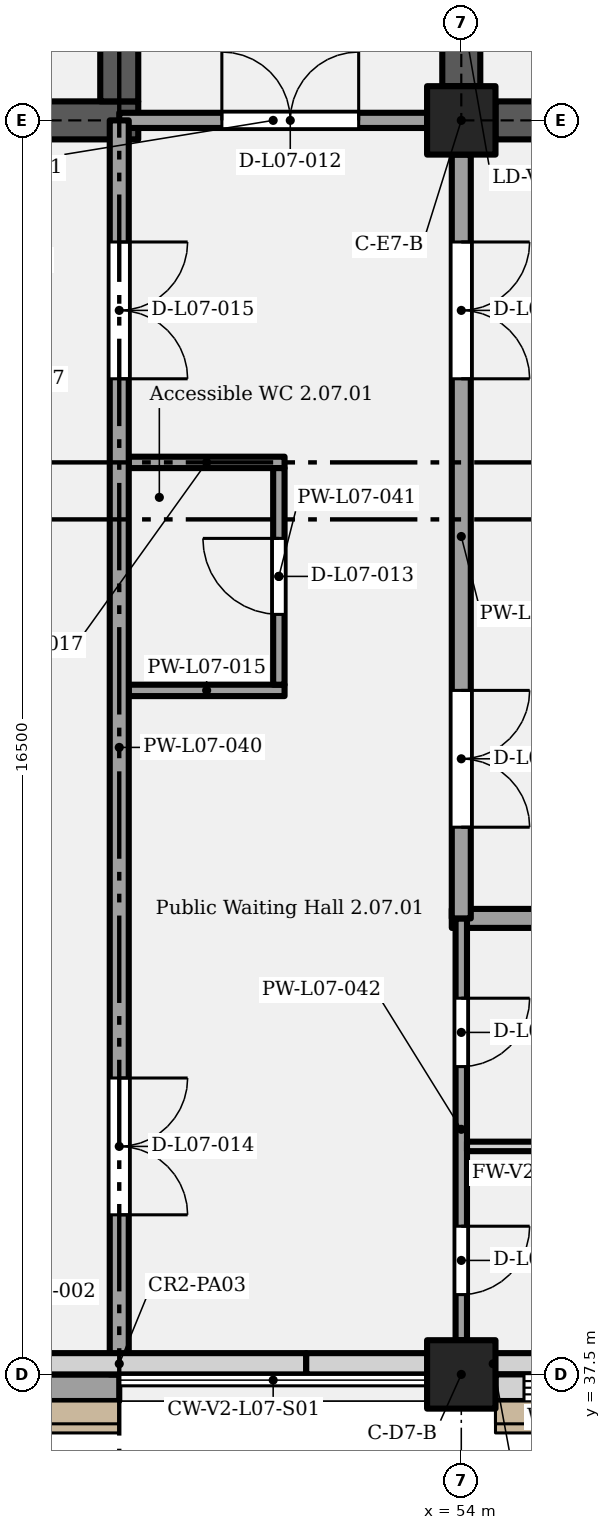
"""IFC4 building model, lengths in metres.
Left out: names, types, materials, properties, quantities, classifications, styles, units other than length and angle.
Written with IfcOpenShell. Run it as: python <this file> out.ifc"""

import sys

from ifc_helpers import new_model, si_unit, direction, frame, frame_2d, origin, origin_2d, place, context, subcontext, project, spatial, rectangle, extrude, element, fill, save


model = new_model("IFC4")
c1 = context("Model", 3, precision=1e-05, world=origin(), true_north=direction((0.0, 1.0)))
c2 = subcontext(c1, "Body", "Model", "MODEL_VIEW")
j1 = project(units=[si_unit("LENGTHUNIT", "METRE"), si_unit("PLANEANGLEUNIT", "RADIAN")], contexts=[c1])
p1 = place(None, origin())
s1 = spatial("IfcSite", under=j1, at=p1, CompositionType="ELEMENT")
p2 = place(p1, origin())
s2 = spatial("IfcBuilding", under=s1, at=p2, CompositionType="ELEMENT")
p3 = place(p2, frame((0.0, 0.0, 39.0)))
s3 = spatial("IfcBuildingStorey", under=s2, at=p3, CompositionType="ELEMENT", Elevation=39.0)
for number, where, z_axis, x_axis in (
    (1, (54.0, 37.5, 0.0), (0.0, 0.0, 1.0), (1.0, 0.0, 0.0)),
    (2, (54.0, 54.0, 0.0), (0.0, 0.0, 1.0), (1.0, 0.0, 0.0)),
):
    element("IfcColumn", number, at=place(p3, frame(where, z_axis=z_axis, x_axis=x_axis)), inside=s3, PredefinedType="COLUMN", context=c2, shape_type="SweptSolid", body=[
        extrude(rectangle(XDim=0.9, YDim=0.9, at=origin_2d()), origin(), (0.0, 0.0, 1.0), 5.4),
    ])
p4 = place(p3, frame((46.25, 54.0, 0.0), z_axis=(0.0, 0.0, 1.0), x_axis=(1.0, 0.0, 0.0)))
e3 = element("IfcWall", 3, at=p4, inside=s3, PredefinedType="SHEAR", context=c2, shape_type="SweptSolid", body=[
    extrude(rectangle(XDim=3.5, YDim=0.5, at=frame_2d((1.75, 0.0))), origin(), (0.0, 0.0, 1.0), 5.15),
])
p5 = place(p3, frame((54.45, 54.0, 0.0), z_axis=(0.0, 0.0, 1.0), x_axis=(1.0, 0.0, 0.0)))
e4 = element("IfcWall", 4, at=p5, inside=s3, PredefinedType="SHEAR", context=c2, shape_type="SweptSolid", body=[
    extrude(rectangle(XDim=2.8, YDim=0.5, at=frame_2d((1.4, 0.0))), origin(), (0.0, 0.0, 1.0), 5.15),
])
p6 = place(p3, frame((49.5, 54.25, 0.0), z_axis=(0.0, 0.0, 1.0), x_axis=(0.0, 1.0, 0.0)))
e5 = element("IfcWall", 5, at=p6, inside=s3, PredefinedType="SHEAR", context=c2, shape_type="SweptSolid", body=[
    extrude(rectangle(XDim=11.5, YDim=0.5, at=frame_2d((5.75, 0.0))), origin(), (0.0, 0.0, 1.0), 5.15),
])
p7 = place(p6, frame((0.7, 0.0, 0.0)))
e6 = element("IfcOpeningElement", 6, at=p7, cuts=e5, PredefinedType="OPENING", context=c2, shape_type="SweptSolid", body=[
    extrude(rectangle(XDim=1.1, YDim=2.1, at=frame_2d((0.55, 1.05))), frame((0.0, 0.26, 0.0), z_axis=(0.0, -1.0, 0.0), x_axis=(1.0, 0.0, 0.0)), (0.0, 0.0, 1.0), 0.52),
])
p8 = place(p6, frame((4.35, 0.0, 0.0), z_axis=(0.0, 0.0, 1.0), x_axis=(-1.0, 0.0, 0.0)))
e7 = element("IfcOpeningElement", 7, at=p8, cuts=e5, PredefinedType="OPENING", context=c2, shape_type="SweptSolid", body=[
    extrude(rectangle(XDim=1.2, YDim=2.1, at=frame_2d((0.6, 1.05))), frame((0.0, 0.26, 0.0), z_axis=(0.0, -1.0, 0.0), x_axis=(1.0, 0.0, 0.0)), (0.0, 0.0, 1.0), 0.52),
])
p9 = place(p3, frame((54.0, 54.45, 0.0), z_axis=(0.0, 0.0, 1.0), x_axis=(0.0, 1.0, 0.0)))
e8 = element("IfcWall", 8, at=p9, inside=s3, PredefinedType="SHEAR", context=c2, shape_type="SweptSolid", body=[
    extrude(rectangle(XDim=11.1, YDim=0.5, at=frame_2d((5.55, 0.0))), origin(), (0.0, 0.0, 1.0), 5.15),
])
p10 = place(p9, frame((0.5, 0.0, 0.0)))
e9 = element("IfcOpeningElement", 9, at=p10, cuts=e8, PredefinedType="OPENING", context=c2, shape_type="SweptSolid", body=[
    extrude(rectangle(XDim=1.1, YDim=2.1, at=frame_2d((0.55, 1.05))), frame((0.0, 0.26, 0.0), z_axis=(0.0, -1.0, 0.0), x_axis=(1.0, 0.0, 0.0)), (0.0, 0.0, 1.0), 0.52),
])
p11 = place(p9, frame((2.95, 0.0, 0.0)))
e10 = element("IfcOpeningElement", 10, at=p11, cuts=e8, PredefinedType="OPENING", context=c2, shape_type="SweptSolid", body=[
    extrude(rectangle(XDim=1.2, YDim=2.1, at=frame_2d((0.6, 1.05))), frame((0.0, 0.26, 0.0), z_axis=(0.0, -1.0, 0.0), x_axis=(1.0, 0.0, 0.0)), (0.0, 0.0, 1.0), 0.52),
])
p12 = place(p3, frame((45.45, 37.325, 0.0), z_axis=(0.0, 0.0, 1.0), x_axis=(1.0, 0.0, 0.0)))
e11 = element("IfcWall", 11, at=p12, inside=s3, PredefinedType="SOLIDWALL", context=c2, shape_type="SweptSolid", body=[
    extrude(rectangle(XDim=4.05, YDim=0.35, at=frame_2d((2.025, 0.0))), origin(), (0.0, 0.0, 1.0), 5.15),
])
p13 = place(p12, frame((0.375, 0.0, 1.2)))
e12 = element("IfcOpeningElement", 12, at=p13, cuts=e11, PredefinedType="OPENING", context=c2, shape_type="SweptSolid", body=[
    extrude(rectangle(XDim=1.35, YDim=3.0, at=frame_2d((0.675, 1.5))), frame((0.0, 0.185, 0.0), z_axis=(0.0, -1.0, 0.0), x_axis=(1.0, 0.0, 0.0)), (0.0, 0.0, 1.0), 0.37),
])
p14 = place(p3, frame((54.45, 37.325, 0.0), z_axis=(0.0, 0.0, 1.0), x_axis=(1.0, 0.0, 0.0)))
e13 = element("IfcWall", 13, at=p14, inside=s3, PredefinedType="SOLIDWALL", context=c2, shape_type="SweptSolid", body=[
    extrude(rectangle(XDim=8.1, YDim=0.35, at=frame_2d((4.05, 0.0))), origin(), (0.0, 0.0, 1.0), 5.15),
])
p15 = place(p14, frame((0.375, 0.0, 1.2)))
e14 = element("IfcOpeningElement", 14, at=p15, cuts=e13, PredefinedType="OPENING", context=c2, shape_type="SweptSolid", body=[
    extrude(rectangle(XDim=1.35, YDim=3.0, at=frame_2d((0.675, 1.5))), frame((0.0, 0.185, 0.0), z_axis=(0.0, -1.0, 0.0), x_axis=(1.0, 0.0, 0.0)), (0.0, 0.0, 1.0), 0.37),
])
p16 = place(p14, frame((3.375, 0.0, 1.2)))
e15 = element("IfcOpeningElement", 15, at=p16, cuts=e13, PredefinedType="OPENING", context=c2, shape_type="SweptSolid", body=[
    extrude(rectangle(XDim=1.35, YDim=3.0, at=frame_2d((0.675, 1.5))), frame((0.0, 0.185, 0.0), z_axis=(0.0, -1.0, 0.0), x_axis=(1.0, 0.0, 0.0)), (0.0, 0.0, 1.0), 0.37),
])
p17 = place(p14, frame((6.375, 0.0, 1.2)))
e16 = element("IfcOpeningElement", 16, at=p17, cuts=e13, PredefinedType="OPENING", context=c2, shape_type="SweptSolid", body=[
    extrude(rectangle(XDim=1.35, YDim=3.0, at=frame_2d((0.675, 1.5))), frame((0.0, 0.185, 0.0), z_axis=(0.0, -1.0, 0.0), x_axis=(1.0, 0.0, 0.0)), (0.0, 0.0, 1.0), 0.37),
])
p18 = place(p3, frame((47.04, 37.64, 5.4), z_axis=(0.0, 0.0, 1.0), x_axis=(1.0, 0.0, 0.0)))
e17 = element("IfcWall", 17, at=p18, inside=s3, PredefinedType="PARAPET", context=c2, shape_type="SweptSolid", body=[
    extrude(rectangle(XDim=4.92, YDim=0.28, at=frame_2d((2.46, 0.0))), origin(), (0.0, 0.0, 1.0), 1.6),
])
p19 = place(p3, frame((51.96, 37.64, 5.4), z_axis=(0.0, 0.0, 1.0), x_axis=(1.0, 0.0, 0.0)))
e18 = element("IfcWall", 18, at=p19, inside=s3, PredefinedType="PARAPET", context=c2, shape_type="SweptSolid", body=[
    extrude(rectangle(XDim=4.92, YDim=0.28, at=frame_2d((2.46, 0.0))), origin(), (0.0, 0.0, 1.0), 1.4),
])
p20 = place(p3, frame((54.075, 40.5, 0.0), z_axis=(0.0, 0.0, 1.0), x_axis=(1.0, 0.0, 0.0)))
e19 = element("IfcWall", 19, at=p20, inside=s3, PredefinedType="PARTITIONING", context=c2, shape_type="SweptSolid", body=[
    extrude(rectangle(XDim=8.925, YDim=0.125, at=frame_2d((4.462, 0.0))), origin(), (0.0, 0.0, 1.0), 5.15),
])
p21 = place(p3, frame((53.875, 43.5, 0.0), z_axis=(0.0, 0.0, 1.0), x_axis=(1.0, 0.0, 0.0)))
e20 = element("IfcWall", 20, at=p21, inside=s3, PredefinedType="PARTITIONING", context=c2, shape_type="SweptSolid", body=[
    extrude(rectangle(XDim=9.125, YDim=0.25, at=frame_2d((4.562, 0.0))), origin(), (0.0, 0.0, 1.0), 5.15),
])
for number, where, z_axis, x_axis in (
    (21, (49.625, 46.5, 0.0), (0.0, 0.0, 1.0), (1.0, 0.0, 0.0)),
    (22, (49.625, 49.5, 0.0), (0.0, 0.0, 1.0), (1.0, 0.0, 0.0)),
):
    element("IfcWall", number, at=place(p3, frame(where, z_axis=z_axis, x_axis=x_axis)), inside=s3, PredefinedType="PARTITIONING", context=c2, shape_type="SweptSolid", body=[
        extrude(rectangle(XDim=2.05, YDim=0.15, at=frame_2d((1.025, 0.0))), origin(), (0.0, 0.0, 1.0), 5.15),
    ])
p22 = place(p3, frame((49.5, 54.0, 0.0), z_axis=(0.0, 0.0, 1.0), x_axis=(1.0, 0.0, 0.0)))
e23 = element("IfcWall", 23, at=p22, inside=s3, PredefinedType="PARTITIONING", context=c2, shape_type="SweptSolid", body=[
    extrude(rectangle(XDim=4.05, YDim=0.2, at=frame_2d((2.025, 0.0))), origin(), (0.0, 0.0, 1.0), 4.4),
])
p23 = place(p22, frame((1.35, 0.0, 0.0)))
e24 = element("IfcOpeningElement", 24, at=p23, cuts=e23, PredefinedType="OPENING", context=c2, shape_type="SweptSolid", body=[
    extrude(rectangle(XDim=1.8, YDim=2.1, at=frame_2d((0.9, 1.05))), frame((0.0, 0.11, 0.0), z_axis=(0.0, -1.0, 0.0), x_axis=(1.0, 0.0, 0.0)), (0.0, 0.0, 1.0), 0.22),
])
p24 = place(p3, frame((49.5, 37.5, 0.0), z_axis=(0.0, 0.0, 1.0), x_axis=(0.0, 1.0, 0.0)))
e25 = element("IfcWall", 25, at=p24, inside=s3, PredefinedType="PARTITIONING", context=c2, shape_type="SweptSolid", body=[
    extrude(rectangle(XDim=16.5, YDim=0.25, at=frame_2d((8.25, 0.0))), origin(), (0.0, 0.0, 1.0), 5.15),
])
p25 = place(p24, frame((3.9, 0.0, 0.0), z_axis=(0.0, 0.0, 1.0), x_axis=(-1.0, 0.0, 0.0)))
e26 = element("IfcOpeningElement", 26, at=p25, cuts=e25, PredefinedType="OPENING", context=c2, shape_type="SweptSolid", body=[
    extrude(rectangle(XDim=1.8, YDim=2.4, at=frame_2d((0.9, 1.2))), frame((0.0, 0.135, 0.0), z_axis=(0.0, -1.0, 0.0), x_axis=(1.0, 0.0, 0.0)), (0.0, 0.0, 1.0), 0.27),
])
p26 = place(p24, frame((14.9, 0.0, 0.0), z_axis=(0.0, 0.0, 1.0), x_axis=(-1.0, 0.0, 0.0)))
e27 = element("IfcOpeningElement", 27, at=p26, cuts=e25, PredefinedType="OPENING", context=c2, shape_type="SweptSolid", body=[
    extrude(rectangle(XDim=1.8, YDim=2.4, at=frame_2d((0.9, 1.2))), frame((0.0, 0.135, 0.0), z_axis=(0.0, -1.0, 0.0), x_axis=(1.0, 0.0, 0.0)), (0.0, 0.0, 1.0), 0.27),
])
p27 = place(p3, frame((51.6, 46.575, 0.0), z_axis=(0.0, 0.0, 1.0), x_axis=(0.0, 1.0, 0.0)))
e28 = element("IfcWall", 28, at=p27, inside=s3, PredefinedType="PARTITIONING", context=c2, shape_type="SweptSolid", body=[
    extrude(rectangle(XDim=2.85, YDim=0.15, at=frame_2d((1.425, 0.0))), origin(), (0.0, 0.0, 1.0), 5.15),
])
p28 = place(p27, frame((0.925, 0.0, 0.0)))
e29 = element("IfcOpeningElement", 29, at=p28, cuts=e28, PredefinedType="OPENING", context=c2, shape_type="SweptSolid", body=[
    extrude(rectangle(XDim=1.0, YDim=2.1, at=frame_2d((0.5, 1.05))), frame((0.0, 0.085, 0.0), z_axis=(0.0, -1.0, 0.0), x_axis=(1.0, 0.0, 0.0)), (0.0, 0.0, 1.0), 0.17),
])
p29 = place(p3, frame((54.0, 37.95, 0.0), z_axis=(0.0, 0.0, 1.0), x_axis=(0.0, 1.0, 0.0)))
e30 = element("IfcWall", 30, at=p29, inside=s3, PredefinedType="PARTITIONING", context=c2, shape_type="SweptSolid", body=[
    extrude(rectangle(XDim=5.55, YDim=0.15, at=frame_2d((2.775, 0.0))), origin(), (0.0, 0.0, 1.0), 4.2),
])
p30 = place(p29, frame((4.5, 0.0, 0.0), z_axis=(0.0, 0.0, 1.0), x_axis=(-1.0, 0.0, 0.0)))
e31 = element("IfcOpeningElement", 31, at=p30, cuts=e30, PredefinedType="OPENING", context=c2, shape_type="SweptSolid", body=[
    extrude(rectangle(XDim=0.9, YDim=2.1, at=frame_2d((0.45, 1.05))), frame((0.0, 0.085, 0.0), z_axis=(0.0, -1.0, 0.0), x_axis=(1.0, 0.0, 0.0)), (0.0, 0.0, 1.0), 0.17),
])
p31 = place(p29, frame((1.5, 0.0, 0.0), z_axis=(0.0, 0.0, 1.0), x_axis=(-1.0, 0.0, 0.0)))
e32 = element("IfcOpeningElement", 32, at=p31, cuts=e30, PredefinedType="OPENING", context=c2, shape_type="SweptSolid", body=[
    extrude(rectangle(XDim=0.9, YDim=2.1, at=frame_2d((0.45, 1.05))), frame((0.0, 0.085, 0.0), z_axis=(0.0, -1.0, 0.0), x_axis=(1.0, 0.0, 0.0)), (0.0, 0.0, 1.0), 0.17),
])
p32 = place(p3, frame((54.0, 43.5, 0.0), z_axis=(0.0, 0.0, 1.0), x_axis=(0.0, 1.0, 0.0)))
e33 = element("IfcWall", 33, at=p32, inside=s3, PredefinedType="PARTITIONING", context=c2, shape_type="SweptSolid", body=[
    extrude(rectangle(XDim=10.05, YDim=0.25, at=frame_2d((5.025, 0.0))), origin(), (0.0, 0.0, 1.0), 4.2),
])
p33 = place(p32, frame((3.0, 0.0, 0.0), z_axis=(0.0, 0.0, 1.0), x_axis=(-1.0, 0.0, 0.0)))
e34 = element("IfcOpeningElement", 34, at=p33, cuts=e33, PredefinedType="OPENING", context=c2, shape_type="SweptSolid", body=[
    extrude(rectangle(XDim=1.8, YDim=2.4, at=frame_2d((0.9, 1.2))), frame((0.0, 0.135, 0.0), z_axis=(0.0, -1.0, 0.0), x_axis=(1.0, 0.0, 0.0)), (0.0, 0.0, 1.0), 0.27),
])
p34 = place(p32, frame((8.9, 0.0, 0.0), z_axis=(0.0, 0.0, 1.0), x_axis=(-1.0, 0.0, 0.0)))
e35 = element("IfcOpeningElement", 35, at=p34, cuts=e33, PredefinedType="OPENING", context=c2, shape_type="SweptSolid", body=[
    extrude(rectangle(XDim=1.8, YDim=2.4, at=frame_2d((0.9, 1.2))), frame((0.0, 0.135, 0.0), z_axis=(0.0, -1.0, 0.0), x_axis=(1.0, 0.0, 0.0)), (0.0, 0.0, 1.0), 0.27),
])
p35 = place(p15, origin())
e36 = element("IfcWindow", 36, at=p35, inside=s3, PartitioningType="SINGLE_PANEL", PredefinedType="WINDOW", context=c2, shape_type="SweptSolid", body=[
    extrude(rectangle(XDim=1.35, YDim=3.0, at=frame_2d((0.675, 1.5))), frame((0.0, 0.03, 0.0), z_axis=(0.0, -1.0, 0.0), x_axis=(1.0, 0.0, 0.0)), (0.0, 0.0, 1.0), 0.06),
])
fill(e14, e36)
p36 = place(p23, origin())
e37 = element("IfcDoor", 37, at=p36, inside=s3, OperationType="DOUBLE_DOOR_SINGLE_SWING", PredefinedType="DOOR", context=c2, shape_type="SweptSolid", body=[
    extrude(rectangle(XDim=1.8, YDim=2.1, at=frame_2d((0.9, 1.05))), frame((0.0, 0.025, 0.0), z_axis=(0.0, -1.0, 0.0), x_axis=(1.0, 0.0, 0.0)), (0.0, 0.0, 1.0), 0.05),
])
fill(e24, e37)
p37 = place(p28, origin())
e38 = element("IfcDoor", 38, at=p37, inside=s3, OperationType="SINGLE_SWING_RIGHT", PredefinedType="DOOR", context=c2, shape_type="SweptSolid", body=[
    extrude(rectangle(XDim=1.0, YDim=2.1, at=frame_2d((0.5, 1.05))), frame((0.0, 0.025, 0.0), z_axis=(0.0, -1.0, 0.0), x_axis=(1.0, 0.0, 0.0)), (0.0, 0.0, 1.0), 0.05),
])
fill(e29, e38)
p38 = place(p25, origin())
e39 = element("IfcDoor", 39, at=p38, inside=s3, OperationType="DOUBLE_DOOR_SINGLE_SWING", PredefinedType="DOOR", context=c2, shape_type="SweptSolid", body=[
    extrude(rectangle(XDim=1.8, YDim=2.4, at=frame_2d((0.9, 1.2))), frame((0.0, 0.025, 0.0), z_axis=(0.0, -1.0, 0.0), x_axis=(1.0, 0.0, 0.0)), (0.0, 0.0, 1.0), 0.05),
])
fill(e26, e39)
p39 = place(p26, origin())
e40 = element("IfcDoor", 40, at=p39, inside=s3, OperationType="DOUBLE_DOOR_SINGLE_SWING", PredefinedType="DOOR", context=c2, shape_type="SweptSolid", body=[
    extrude(rectangle(XDim=1.8, YDim=2.4, at=frame_2d((0.9, 1.2))), frame((0.0, 0.025, 0.0), z_axis=(0.0, -1.0, 0.0), x_axis=(1.0, 0.0, 0.0)), (0.0, 0.0, 1.0), 0.05),
])
fill(e27, e40)
p40 = place(p30, origin())
e41 = element("IfcDoor", 41, at=p40, inside=s3, OperationType="SINGLE_SWING_LEFT", PredefinedType="DOOR", context=c2, shape_type="SweptSolid", body=[
    extrude(rectangle(XDim=0.9, YDim=2.1, at=frame_2d((0.45, 1.05))), frame((0.0, 0.025, 0.0), z_axis=(0.0, -1.0, 0.0), x_axis=(1.0, 0.0, 0.0)), (0.0, 0.0, 1.0), 0.05),
])
fill(e31, e41)
p41 = place(p31, origin())
e42 = element("IfcDoor", 42, at=p41, inside=s3, OperationType="SINGLE_SWING_LEFT", PredefinedType="DOOR", context=c2, shape_type="SweptSolid", body=[
    extrude(rectangle(XDim=0.9, YDim=2.1, at=frame_2d((0.45, 1.05))), frame((0.0, 0.025, 0.0), z_axis=(0.0, -1.0, 0.0), x_axis=(1.0, 0.0, 0.0)), (0.0, 0.0, 1.0), 0.05),
])
fill(e32, e42)
p42 = place(p33, origin())
e43 = element("IfcDoor", 43, at=p42, inside=s3, OperationType="DOUBLE_DOOR_SINGLE_SWING", PredefinedType="DOOR", context=c2, shape_type="SweptSolid", body=[
    extrude(rectangle(XDim=1.8, YDim=2.4, at=frame_2d((0.9, 1.2))), frame((0.0, 0.025, 0.0), z_axis=(0.0, -1.0, 0.0), x_axis=(1.0, 0.0, 0.0)), (0.0, 0.0, 1.0), 0.05),
])
fill(e34, e43)
p43 = place(p34, origin())
e44 = element("IfcDoor", 44, at=p43, inside=s3, OperationType="DOUBLE_DOOR_SINGLE_SWING", PredefinedType="DOOR", context=c2, shape_type="SweptSolid", body=[
    extrude(rectangle(XDim=1.8, YDim=2.4, at=frame_2d((0.9, 1.2))), frame((0.0, 0.025, 0.0), z_axis=(0.0, -1.0, 0.0), x_axis=(1.0, 0.0, 0.0)), (0.0, 0.0, 1.0), 0.05),
])
fill(e35, e44)
save(model, sys.argv[1])
